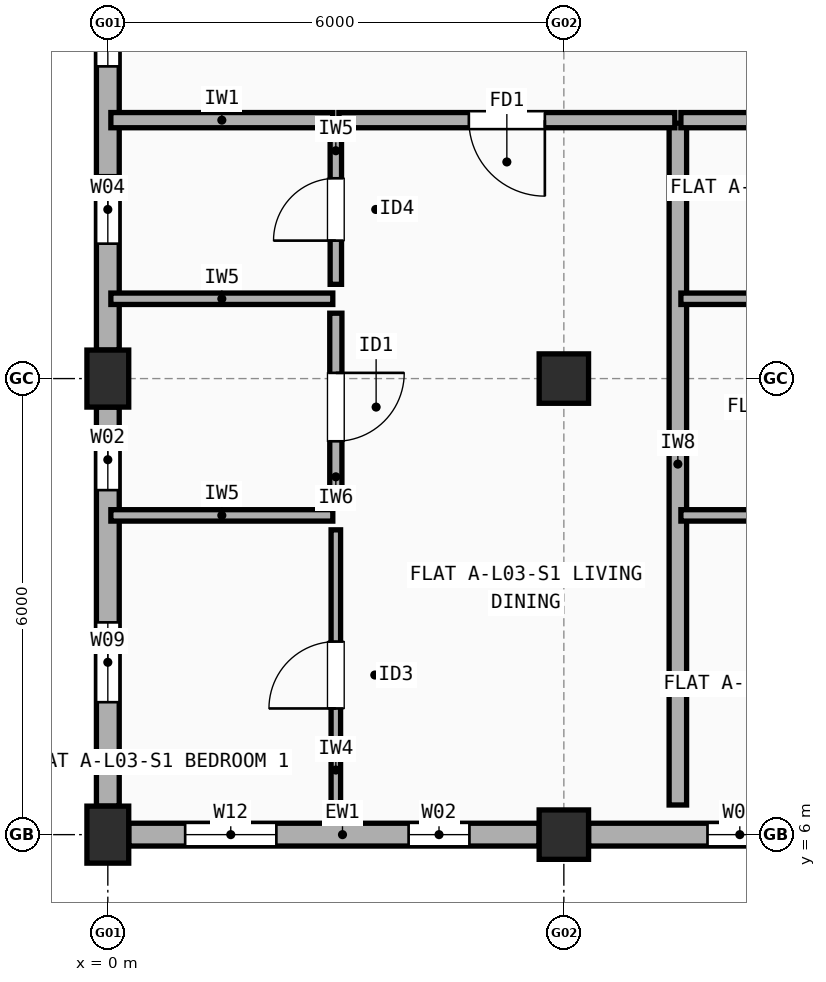
"""IFC4 building model, lengths in metres.
Left out: names, types, materials, properties, quantities, classifications, styles, units other than length and angle.
Written with IfcOpenShell. Run it as: python <this file> out.ifc"""

import sys

from ifc_helpers import new_model, si_unit, direction, frame, frame_2d, origin, origin_2d, place, context, subcontext, project, spatial, rectangle, extrude, element, fill, save


model = new_model("IFC4")
c1 = context("Model", 3, precision=1e-05, world=origin(), true_north=direction((0.0, 1.0)))
c2 = subcontext(c1, "Body", "Model", "MODEL_VIEW")
j1 = project(units=[si_unit("LENGTHUNIT", "METRE"), si_unit("PLANEANGLEUNIT", "RADIAN")], contexts=[c1])
p1 = place(None, origin())
s1 = spatial("IfcSite", under=j1, at=p1, CompositionType="ELEMENT")
p2 = place(p1, origin())
s2 = spatial("IfcBuilding", under=s1, at=p2, CompositionType="ELEMENT")
p3 = place(p2, frame((0.0, 0.0, 10.9)))
s3 = spatial("IfcBuildingStorey", under=s2, at=p3, CompositionType="ELEMENT", Elevation=10.9)
for number, where, z_axis, x_axis in (
    (1, (0.0, 6.0, 0.0), (0.0, 0.0, 1.0), (1.0, 0.0, 0.0)),
    (2, (0.0, 12.0, 0.0), (0.0, 0.0, 1.0), (1.0, 0.0, 0.0)),
):
    element("IfcColumn", number, at=place(p3, frame(where, z_axis=z_axis, x_axis=x_axis)), inside=s3, PredefinedType="COLUMN", context=c2, shape_type="SweptSolid", body=[
        extrude(rectangle(XDim=0.55, YDim=0.75, at=origin_2d()), origin(), (0.0, 0.0, 1.0), 2.96),
    ])
for number, where, z_axis, x_axis in (
    (3, (6.0, 6.0, 0.0), (0.0, 0.0, 1.0), (1.0, 0.0, 0.0)),
    (4, (6.0, 12.0, 0.0), (0.0, 0.0, 1.0), (1.0, 0.0, 0.0)),
):
    element("IfcColumn", number, at=place(p3, frame(where, z_axis=z_axis, x_axis=x_axis)), inside=s3, PredefinedType="COLUMN", context=c2, shape_type="SweptSolid", body=[
        extrude(rectangle(XDim=0.65, YDim=0.65, at=origin_2d()), origin(), (0.0, 0.0, 1.0), 2.96),
    ])
p4 = place(p3, frame((0.275, 6.0, 0.0), z_axis=(0.0, 0.0, 1.0), x_axis=(1.0, 0.0, 0.0)))
e5 = element("IfcWall", 5, at=p4, inside=s3, PredefinedType="STANDARD", context=c2, shape_type="SweptSolid", body=[
    extrude(rectangle(XDim=5.4, YDim=0.3, at=frame_2d((2.7, 0.0))), origin(), (0.0, 0.0, 1.0), 2.442),
])
p5 = place(p4, frame((0.742, 0.0, 0.9)))
e6 = element("IfcOpeningElement", 6, at=p5, cuts=e5, PredefinedType="OPENING", context=c2, shape_type="SweptSolid", body=[
    extrude(rectangle(XDim=1.2, YDim=1.35, at=frame_2d((0.6, 0.675))), frame((0.0, 0.16, 0.0), z_axis=(0.0, -1.0, 0.0), x_axis=(1.0, 0.0, 0.0)), (0.0, 0.0, 1.0), 0.32),
])
p6 = place(p4, frame((3.683, 0.0, 0.9)))
e7 = element("IfcOpeningElement", 7, at=p6, cuts=e5, PredefinedType="OPENING", context=c2, shape_type="SweptSolid", body=[
    extrude(rectangle(XDim=0.8, YDim=1.2, at=frame_2d((0.4, 0.6))), frame((0.0, 0.16, 0.0), z_axis=(0.0, -1.0, 0.0), x_axis=(1.0, 0.0, 0.0)), (0.0, 0.0, 1.0), 0.32),
])
p7 = place(p3, frame((6.325, 6.0, 0.0), z_axis=(0.0, 0.0, 1.0), x_axis=(1.0, 0.0, 0.0)))
e8 = element("IfcWall", 8, at=p7, inside=s3, PredefinedType="STANDARD", context=c2, shape_type="SweptSolid", body=[
    extrude(rectangle(XDim=5.35, YDim=0.3, at=frame_2d((2.675, 0.0))), origin(), (0.0, 0.0, 1.0), 2.442),
])
p8 = place(p7, frame((1.565, 0.0, 0.9)))
e9 = element("IfcOpeningElement", 9, at=p8, cuts=e8, PredefinedType="OPENING", context=c2, shape_type="SweptSolid", body=[
    extrude(rectangle(XDim=0.85, YDim=1.25, at=frame_2d((0.425, 0.625))), frame((0.0, 0.16, 0.0), z_axis=(0.0, -1.0, 0.0), x_axis=(1.0, 0.0, 0.0)), (0.0, 0.0, 1.0), 0.32),
])
p9 = place(p7, frame((4.15, 0.0, 0.9)))
e10 = element("IfcOpeningElement", 10, at=p9, cuts=e8, PredefinedType="OPENING", context=c2, shape_type="SweptSolid", body=[
    extrude(rectangle(XDim=0.85, YDim=1.25, at=frame_2d((0.425, 0.625))), frame((0.0, 0.16, 0.0), z_axis=(0.0, -1.0, 0.0), x_axis=(1.0, 0.0, 0.0)), (0.0, 0.0, 1.0), 0.32),
])
p10 = place(p3, frame((0.0, 17.625, 0.0), z_axis=(0.0, 0.0, 1.0), x_axis=(0.0, -1.0, 0.0)))
e11 = element("IfcWall", 11, at=p10, inside=s3, PredefinedType="STANDARD", context=c2, shape_type="SweptSolid", body=[
    extrude(rectangle(XDim=5.25, YDim=0.3, at=frame_2d((2.625, 0.0))), origin(), (0.0, 0.0, 1.0), 2.442),
])
p11 = place(p10, frame((0.667, 0.0, 0.9)))
e12 = element("IfcOpeningElement", 12, at=p11, cuts=e11, PredefinedType="OPENING", context=c2, shape_type="SweptSolid", body=[
    extrude(rectangle(XDim=0.85, YDim=1.25, at=frame_2d((0.425, 0.625))), frame((0.0, 0.16, 0.0), z_axis=(0.0, -1.0, 0.0), x_axis=(1.0, 0.0, 0.0)), (0.0, 0.0, 1.0), 0.32),
])
p12 = place(p10, frame((2.95, 0.0, 0.9)))
e13 = element("IfcOpeningElement", 13, at=p12, cuts=e11, PredefinedType="OPENING", context=c2, shape_type="SweptSolid", body=[
    extrude(rectangle(XDim=0.9, YDim=1.3, at=frame_2d((0.45, 0.65))), frame((0.0, 0.16, 0.0), z_axis=(0.0, -1.0, 0.0), x_axis=(1.0, 0.0, 0.0)), (0.0, 0.0, 1.0), 0.32),
])
p13 = place(p3, frame((0.0, 11.625, 0.0), z_axis=(0.0, 0.0, 1.0), x_axis=(0.0, -1.0, 0.0)))
e14 = element("IfcWall", 14, at=p13, inside=s3, PredefinedType="STANDARD", context=c2, shape_type="SweptSolid", body=[
    extrude(rectangle(XDim=5.25, YDim=0.3, at=frame_2d((2.625, 0.0))), origin(), (0.0, 0.0, 1.0), 2.442),
])
p14 = place(p13, frame((0.292, 0.0, 0.9)))
e15 = element("IfcOpeningElement", 15, at=p14, cuts=e14, PredefinedType="OPENING", context=c2, shape_type="SweptSolid", body=[
    extrude(rectangle(XDim=0.8, YDim=1.2, at=frame_2d((0.4, 0.6))), frame((0.0, 0.16, 0.0), z_axis=(0.0, -1.0, 0.0), x_axis=(1.0, 0.0, 0.0)), (0.0, 0.0, 1.0), 0.32),
])
p15 = place(p13, frame((2.833, 0.0, 0.9)))
e16 = element("IfcOpeningElement", 16, at=p15, cuts=e14, PredefinedType="OPENING", context=c2, shape_type="SweptSolid", body=[
    extrude(rectangle(XDim=1.05, YDim=1.35, at=frame_2d((0.525, 0.675))), frame((0.0, 0.16, 0.0), z_axis=(0.0, -1.0, 0.0), x_axis=(1.0, 0.0, 0.0)), (0.0, 0.0, 1.0), 0.32),
])
p16 = place(p3, frame((7.5, 6.39, 0.0), z_axis=(0.0, 0.0, 1.0), x_axis=(0.0, 1.0, 0.0)))
e17 = element("IfcWall", 17, at=p16, inside=s3, PredefinedType="SOLIDWALL", context=c2, shape_type="SweptSolid", body=[
    extrude(rectangle(XDim=8.97, YDim=0.23, at=frame_2d((4.485, 0.0))), origin(), (0.0, 0.0, 1.0), 2.548),
])
p17 = place(p3, frame((0.04, 15.4, 0.0), z_axis=(0.0, 0.0, 1.0), x_axis=(1.0, 0.0, 0.0)))
e18 = element("IfcWall", 18, at=p17, inside=s3, PredefinedType="SOLIDWALL", context=c2, shape_type="SweptSolid", body=[
    extrude(rectangle(XDim=2.92, YDim=0.2, at=frame_2d((1.46, 0.0))), origin(), (0.0, 0.0, 1.0), 2.442),
])
p18 = place(p3, frame((3.04, 15.4, 0.0), z_axis=(0.0, 0.0, 1.0), x_axis=(1.0, 0.0, 0.0)))
e19 = element("IfcWall", 19, at=p18, inside=s3, PredefinedType="SOLIDWALL", context=c2, shape_type="SweptSolid", body=[
    extrude(rectangle(XDim=4.42, YDim=0.2, at=frame_2d((2.21, 0.0))), origin(), (0.0, 0.0, 1.0), 2.508),
])
p19 = place(p18, frame((1.71, 0.0, 0.0)))
e20 = element("IfcOpeningElement", 20, at=p19, cuts=e19, PredefinedType="OPENING", context=c2, shape_type="SweptSolid", body=[
    extrude(rectangle(XDim=1.0, YDim=2.15, at=frame_2d((0.5, 1.075))), frame((0.0, 0.11, 0.0), z_axis=(0.0, -1.0, 0.0), x_axis=(1.0, 0.0, 0.0)), (0.0, 0.0, 1.0), 0.22),
])
p20 = place(p3, frame((3.0, 6.19, 0.0), z_axis=(0.0, 0.0, 1.0), x_axis=(0.0, 1.0, 0.0)))
e21 = element("IfcWall", 21, at=p20, inside=s3, PredefinedType="PARTITIONING", context=c2, shape_type="SweptSolid", body=[
    extrude(rectangle(XDim=3.82, YDim=0.125, at=frame_2d((1.91, 0.0))), origin(), (0.0, 0.0, 1.0), 2.96),
])
p21 = place(p20, frame((1.47, 0.0, 0.0)))
e22 = element("IfcOpeningElement", 22, at=p21, cuts=e21, PredefinedType="OPENING", context=c2, shape_type="SweptSolid", body=[
    extrude(rectangle(XDim=0.88, YDim=2.1, at=frame_2d((0.44, 1.05))), frame((0.0, 0.073, 0.0), z_axis=(0.0, -1.0, 0.0), x_axis=(1.0, 0.0, 0.0)), (0.0, 0.0, 1.0), 0.145),
])
p22 = place(p3, frame((3.0, 10.39, 0.0), z_axis=(0.0, 0.0, 1.0), x_axis=(0.0, 1.0, 0.0)))
e23 = element("IfcWall", 23, at=p22, inside=s3, PredefinedType="PLUMBINGWALL", context=c2, shape_type="SweptSolid", body=[
    extrude(rectangle(XDim=2.47, YDim=0.16, at=frame_2d((1.235, 0.0))), origin(), (0.0, 0.0, 1.0), 2.408),
])
p23 = place(p22, frame((0.785, 0.0, 0.0)))
e24 = element("IfcOpeningElement", 24, at=p23, cuts=e23, PredefinedType="OPENING", context=c2, shape_type="SweptSolid", body=[
    extrude(rectangle(XDim=0.9, YDim=2.1, at=frame_2d((0.45, 1.05))), frame((0.0, 0.09, 0.0), z_axis=(0.0, -1.0, 0.0), x_axis=(1.0, 0.0, 0.0)), (0.0, 0.0, 1.0), 0.18),
])
p24 = place(p3, frame((3.0, 13.24, 0.0), z_axis=(0.0, 0.0, 1.0), x_axis=(0.0, 1.0, 0.0)))
e25 = element("IfcWall", 25, at=p24, inside=s3, PredefinedType="PARTITIONING", context=c2, shape_type="SweptSolid", body=[
    extrude(rectangle(XDim=1.97, YDim=0.15, at=frame_2d((0.985, 0.0))), origin(), (0.0, 0.0, 1.0), 2.96),
])
p25 = place(p24, frame((0.575, 0.0, 0.0)))
e26 = element("IfcOpeningElement", 26, at=p25, cuts=e25, PredefinedType="OPENING", context=c2, shape_type="SweptSolid", body=[
    extrude(rectangle(XDim=0.82, YDim=2.08, at=frame_2d((0.41, 1.04))), frame((0.0, 0.085, 0.0), z_axis=(0.0, -1.0, 0.0), x_axis=(1.0, 0.0, 0.0)), (0.0, 0.0, 1.0), 0.17),
])
for number, where, z_axis, x_axis in (
    (27, (0.04, 10.2, 0.0), (0.0, 0.0, 1.0), (1.0, 0.0, 0.0)),
    (28, (0.04, 13.05, 0.0), (0.0, 0.0, 1.0), (1.0, 0.0, 0.0)),
):
    element("IfcWall", number, at=place(p3, frame(where, z_axis=z_axis, x_axis=x_axis)), inside=s3, PredefinedType="PARTITIONING", context=c2, shape_type="SweptSolid", body=[
        extrude(rectangle(XDim=2.92, YDim=0.15, at=frame_2d((1.46, 0.0))), origin(), (0.0, 0.0, 1.0), 2.442),
    ])
p26 = place(p3, frame((7.54, 15.4, 0.0), z_axis=(0.0, 0.0, 1.0), x_axis=(1.0, 0.0, 0.0)))
e29 = element("IfcWall", 29, at=p26, inside=s3, PredefinedType="SOLIDWALL", context=c2, shape_type="SweptSolid", body=[
    extrude(rectangle(XDim=4.42, YDim=0.2, at=frame_2d((2.21, 0.0))), origin(), (0.0, 0.0, 1.0), 2.458),
])
p27 = place(p3, frame((7.54, 10.2, 0.0), z_axis=(0.0, 0.0, 1.0), x_axis=(1.0, 0.0, 0.0)))
e30 = element("IfcWall", 30, at=p27, inside=s3, PredefinedType="PARTITIONING", context=c2, shape_type="SweptSolid", body=[
    extrude(rectangle(XDim=4.42, YDim=0.15, at=frame_2d((2.21, 0.0))), origin(), (0.0, 0.0, 1.0), 2.508),
])
p28 = place(p3, frame((7.54, 13.05, 0.0), z_axis=(0.0, 0.0, 1.0), x_axis=(1.0, 0.0, 0.0)))
e31 = element("IfcWall", 31, at=p28, inside=s3, PredefinedType="PARTITIONING", context=c2, shape_type="SweptSolid", body=[
    extrude(rectangle(XDim=4.42, YDim=0.15, at=frame_2d((2.21, 0.0))), origin(), (0.0, 0.0, 1.0), 2.458),
])
p29 = place(p5, origin())
e32 = element("IfcWindow", 32, at=p29, inside=s3, PartitioningType="SINGLE_PANEL", PredefinedType="WINDOW", context=c2, shape_type="SweptSolid", body=[
    extrude(rectangle(XDim=1.2, YDim=1.35, at=frame_2d((0.6, 0.675))), frame((0.0, 0.03, 0.0), z_axis=(0.0, -1.0, 0.0), x_axis=(1.0, 0.0, 0.0)), (0.0, 0.0, 1.0), 0.06),
])
fill(e6, e32)
p30 = place(p6, origin())
e33 = element("IfcWindow", 33, at=p30, inside=s3, PartitioningType="SINGLE_PANEL", PredefinedType="WINDOW", context=c2, shape_type="SweptSolid", body=[
    extrude(rectangle(XDim=0.8, YDim=1.2, at=frame_2d((0.4, 0.6))), frame((0.0, 0.03, 0.0), z_axis=(0.0, -1.0, 0.0), x_axis=(1.0, 0.0, 0.0)), (0.0, 0.0, 1.0), 0.06),
])
fill(e7, e33)
p31 = place(p8, origin())
e34 = element("IfcWindow", 34, at=p31, inside=s3, PartitioningType="SINGLE_PANEL", PredefinedType="WINDOW", context=c2, shape_type="SweptSolid", body=[
    extrude(rectangle(XDim=0.85, YDim=1.25, at=frame_2d((0.425, 0.625))), frame((0.0, 0.03, 0.0), z_axis=(0.0, -1.0, 0.0), x_axis=(1.0, 0.0, 0.0)), (0.0, 0.0, 1.0), 0.06),
])
fill(e9, e34)
p32 = place(p11, origin())
e35 = element("IfcWindow", 35, at=p32, inside=s3, PartitioningType="SINGLE_PANEL", PredefinedType="WINDOW", context=c2, shape_type="SweptSolid", body=[
    extrude(rectangle(XDim=0.85, YDim=1.25, at=frame_2d((0.425, 0.625))), frame((0.0, 0.03, 0.0), z_axis=(0.0, -1.0, 0.0), x_axis=(1.0, 0.0, 0.0)), (0.0, 0.0, 1.0), 0.06),
])
fill(e12, e35)
p33 = place(p12, origin())
e36 = element("IfcWindow", 36, at=p33, inside=s3, PartitioningType="SINGLE_PANEL", PredefinedType="WINDOW", context=c2, shape_type="SweptSolid", body=[
    extrude(rectangle(XDim=0.9, YDim=1.3, at=frame_2d((0.45, 0.65))), frame((0.0, 0.03, 0.0), z_axis=(0.0, -1.0, 0.0), x_axis=(1.0, 0.0, 0.0)), (0.0, 0.0, 1.0), 0.06),
])
fill(e13, e36)
p34 = place(p14, origin())
e37 = element("IfcWindow", 37, at=p34, inside=s3, PartitioningType="SINGLE_PANEL", PredefinedType="WINDOW", context=c2, shape_type="SweptSolid", body=[
    extrude(rectangle(XDim=0.8, YDim=1.2, at=frame_2d((0.4, 0.6))), frame((0.0, 0.03, 0.0), z_axis=(0.0, -1.0, 0.0), x_axis=(1.0, 0.0, 0.0)), (0.0, 0.0, 1.0), 0.06),
])
fill(e15, e37)
p35 = place(p15, origin())
e38 = element("IfcWindow", 38, at=p35, inside=s3, PartitioningType="SINGLE_PANEL", PredefinedType="WINDOW", context=c2, shape_type="SweptSolid", body=[
    extrude(rectangle(XDim=1.05, YDim=1.35, at=frame_2d((0.525, 0.675))), frame((0.0, 0.03, 0.0), z_axis=(0.0, -1.0, 0.0), x_axis=(1.0, 0.0, 0.0)), (0.0, 0.0, 1.0), 0.06),
])
fill(e16, e38)
p36 = place(p19, origin())
e39 = element("IfcDoor", 39, at=p36, inside=s3, OperationType="SINGLE_SWING_RIGHT", PredefinedType="DOOR", context=c2, shape_type="SweptSolid", body=[
    extrude(rectangle(XDim=1.0, YDim=2.15, at=frame_2d((0.5, 1.075))), frame((0.0, 0.025, 0.0), z_axis=(0.0, -1.0, 0.0), x_axis=(1.0, 0.0, 0.0)), (0.0, 0.0, 1.0), 0.05),
])
fill(e20, e39)
p37 = place(p21, origin())
e40 = element("IfcDoor", 40, at=p37, inside=s3, OperationType="SINGLE_SWING_LEFT", PredefinedType="DOOR", context=c2, shape_type="SweptSolid", body=[
    extrude(rectangle(XDim=0.88, YDim=2.1, at=frame_2d((0.44, 1.05))), frame((0.0, 0.025, 0.0), z_axis=(0.0, -1.0, 0.0), x_axis=(1.0, 0.0, 0.0)), (0.0, 0.0, 1.0), 0.05),
])
fill(e22, e40)
p38 = place(p23, origin())
e41 = element("IfcDoor", 41, at=p38, inside=s3, OperationType="SINGLE_SWING_RIGHT", PredefinedType="DOOR", context=c2, shape_type="SweptSolid", body=[
    extrude(rectangle(XDim=0.9, YDim=2.1, at=frame_2d((0.45, 1.05))), frame((0.0, 0.025, 0.0), z_axis=(0.0, -1.0, 0.0), x_axis=(1.0, 0.0, 0.0)), (0.0, 0.0, 1.0), 0.05),
])
fill(e24, e41)
p39 = place(p25, origin())
e42 = element("IfcDoor", 42, at=p39, inside=s3, OperationType="SINGLE_SWING_LEFT", PredefinedType="DOOR", context=c2, shape_type="SweptSolid", body=[
    extrude(rectangle(XDim=0.82, YDim=2.08, at=frame_2d((0.41, 1.04))), frame((0.0, 0.025, 0.0), z_axis=(0.0, -1.0, 0.0), x_axis=(1.0, 0.0, 0.0)), (0.0, 0.0, 1.0), 0.05),
])
fill(e26, e42)
save(model, sys.argv[1])
